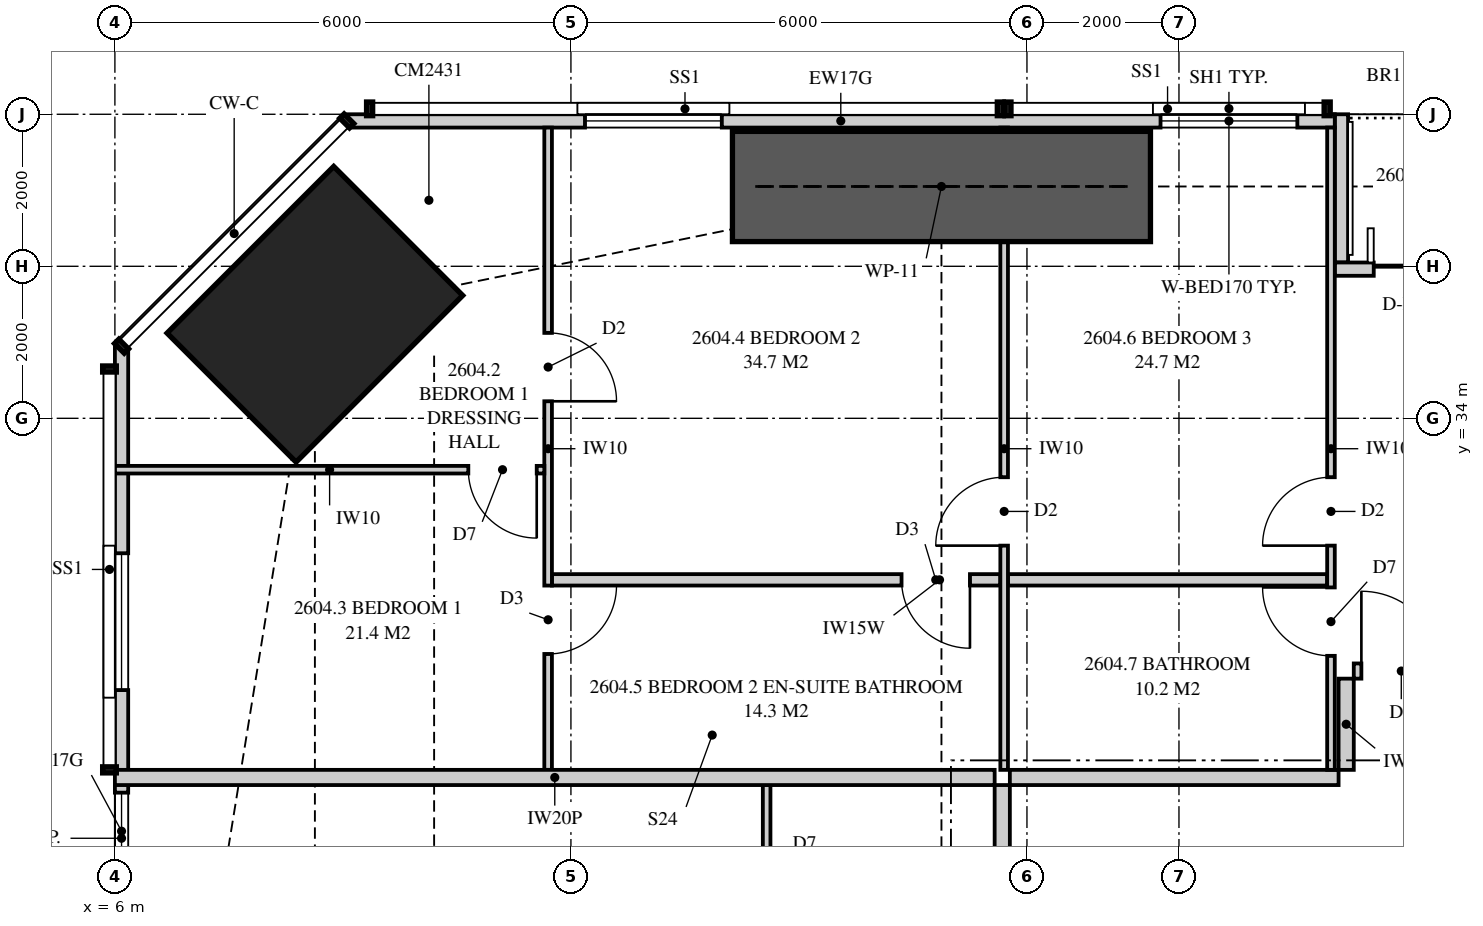
"""IFC4 building model, lengths in metres.
Left out: names, types, materials, properties, quantities, classifications, styles, units other than length and angle.
Written with IfcOpenShell. Run it as: python <this file> out.ifc"""

import sys

from ifc_helpers import new_model, si_unit, direction, frame, frame_2d, origin, origin_2d, place, context, subcontext, project, spatial, polyline, rectangle, outline, extrude, element, fill, save


model = new_model("IFC4")
c1 = context("Model", 3, precision=1e-05, world=origin(), true_north=direction((0.0, 1.0)))
c2 = subcontext(c1, "Body", "Model", "MODEL_VIEW")
j1 = project(units=[si_unit("LENGTHUNIT", "METRE"), si_unit("PLANEANGLEUNIT", "RADIAN")], contexts=[c1])
p1 = place(None, origin())
s1 = spatial("IfcSite", under=j1, at=p1, CompositionType="ELEMENT")
p2 = place(p1, origin())
s2 = spatial("IfcBuilding", under=s1, at=p2, CompositionType="ELEMENT")
p3 = place(p2, frame((0.0, 0.0, 98.15)))
s3 = spatial("IfcBuildingStorey", under=s2, at=p3, CompositionType="ELEMENT", Elevation=98.15)
p4 = place(p3, frame((8.631, 35.369, 0.0), z_axis=(0.0, 0.0, 1.0), x_axis=(0.707106781187, -0.707106781187, 0.0)))
e1 = element("IfcColumn", 1, at=p4, inside=s3, PredefinedType="COLUMN", context=c2, shape_type="SweptSolid", body=[
    extrude(rectangle(XDim=2.4, YDim=3.1, at=origin_2d()), origin(), (0.0, 0.0, 1.0), 3.35),
])
p5 = place(p3, frame((22.05, 37.913, 0.0), z_axis=(0.0, 0.0, 1.0), x_axis=(-1.0, 0.0, 0.0)))
e2 = element("IfcWall", 2, at=p5, inside=s3, PredefinedType="SOLIDWALL", context=c2, shape_type="SweptSolid", body=[
    extrude(outline(polyline([(0.0, 0.0), (12.999, 0.0), (12.999, 3.11), (5.378, 3.11), (5.378, 2.15), (5.333, 2.15), (5.333, 3.11), (5.175, 3.11), (5.175, 2.15), (0.0, 2.15), (0.0, 0.0)])), frame((0.0, 0.087, 0.0), z_axis=(0.0, -1.0, 0.0), x_axis=(1.0, 0.0, 0.0)), (0.0, 0.0, 1.0), 0.175),
])
p6 = place(p5, frame((0.492, 0.0, 0.4)))
e3 = element("IfcOpeningElement", 3, at=p6, cuts=e2, PredefinedType="OPENING", context=c2, shape_type="SweptSolid", body=[
    extrude(rectangle(XDim=1.8, YDim=1.7, at=frame_2d((0.9, 0.85))), frame((0.0, 0.097, 0.0), z_axis=(0.0, -1.0, 0.0), x_axis=(1.0, 0.0, 0.0)), (0.0, 0.0, 1.0), 0.195),
])
p7 = place(p5, frame((8.065, 0.0, 0.4)))
e4 = element("IfcOpeningElement", 4, at=p7, cuts=e2, PredefinedType="OPENING", context=c2, shape_type="SweptSolid", body=[
    extrude(rectangle(XDim=1.8, YDim=1.7, at=frame_2d((0.9, 0.85))), frame((0.0, 0.097, 0.0), z_axis=(0.0, -1.0, 0.0), x_axis=(1.0, 0.0, 0.0)), (0.0, 0.0, 1.0), 0.195),
])
p8 = place(p3, frame((24.875, 35.962, 0.0), z_axis=(0.0, 0.0, 1.0), x_axis=(-1.0, 0.0, 0.0)))
e5 = element("IfcWall", 5, at=p8, inside=s3, PredefinedType="SOLIDWALL", context=c2, shape_type="SweptSolid", body=[
    extrude(rectangle(XDim=2.825, YDim=0.175, at=frame_2d((1.413, 0.0))), origin(), (0.0, 0.0, 1.0), 3.11),
])
p9 = place(p8, frame((0.512, 0.0, 0.0)))
e6 = element("IfcOpeningElement", 6, at=p9, cuts=e5, PredefinedType="OPENING", context=c2, shape_type="SweptSolid", body=[
    extrude(rectangle(XDim=1.8, YDim=2.1, at=frame_2d((0.9, 1.05))), frame((0.0, 0.097, 0.0), z_axis=(0.0, -1.0, 0.0), x_axis=(1.0, 0.0, 0.0)), (0.0, 0.0, 1.0), 0.195),
])
p10 = place(p3, frame((22.137, 38.0, 0.0), z_axis=(0.0, 0.0, 1.0), x_axis=(0.0, -1.0, 0.0)))
e7 = element("IfcWall", 7, at=p10, inside=s3, PredefinedType="SOLIDWALL", context=c2, shape_type="SweptSolid", body=[
    extrude(outline(polyline([(0.0, 0.0), (1.95, 0.0), (1.95, 3.11), (1.75, 3.11), (1.75, 2.15), (0.15, 2.15), (0.15, 3.11), (0.0, 3.11), (0.0, 0.0)])), frame((0.0, 0.087, 0.0), z_axis=(0.0, -1.0, 0.0), x_axis=(1.0, 0.0, 0.0)), (0.0, 0.0, 1.0), 0.175),
])
p11 = place(p3, frame((6.087, 34.949, 0.0), z_axis=(0.0, 0.0, 1.0), x_axis=(0.0, -1.0, 0.0)))
e8 = element("IfcWall", 8, at=p11, inside=s3, PredefinedType="SOLIDWALL", context=c2, shape_type="SweptSolid", body=[
    extrude(outline(polyline([(0.0, 0.0), (12.761, 0.0), (12.761, 2.15), (9.949, 2.15), (9.949, 3.11), (9.823, 3.11), (9.823, 2.15), (9.73, 2.15), (9.73, 3.11), (0.0, 3.11), (0.0, 0.0)])), frame((0.0, 0.087, 0.0), z_axis=(0.0, -1.0, 0.0), x_axis=(1.0, 0.0, 0.0)), (0.0, 0.0, 1.0), 0.175),
])
p12 = place(p11, frame((2.724, 0.0, 0.4)))
e9 = element("IfcOpeningElement", 9, at=p12, cuts=e8, PredefinedType="OPENING", context=c2, shape_type="SweptSolid", body=[
    extrude(rectangle(XDim=1.8, YDim=1.7, at=frame_2d((0.9, 0.85))), frame((0.0, 0.097, 0.0), z_axis=(0.0, -1.0, 0.0), x_axis=(1.0, 0.0, 0.0)), (0.0, 0.0, 1.0), 0.195),
])
p13 = place(p11, frame((5.874, 0.0, 0.4)))
e10 = element("IfcOpeningElement", 10, at=p13, cuts=e8, PredefinedType="OPENING", context=c2, shape_type="SweptSolid", body=[
    extrude(rectangle(XDim=1.2, YDim=1.7, at=frame_2d((0.6, 0.85))), frame((0.0, 0.097, 0.0), z_axis=(0.0, -1.0, 0.0), x_axis=(1.0, 0.0, 0.0)), (0.0, 0.0, 1.0), 0.195),
])
p14 = place(p3, frame((17.775, 29.275, 0.0), z_axis=(0.0, 0.0, 1.0), x_axis=(1.0, 0.0, 0.0)))
e11 = element("IfcWall", 11, at=p14, inside=s3, PredefinedType="PARTITIONING", context=c2, shape_type="SweptSolid", body=[
    extrude(rectangle(XDim=4.325, YDim=0.2, at=frame_2d((2.163, 0.0))), origin(), (0.0, 0.0, 1.0), 3.11),
])
p15 = place(p3, frame((11.7, 37.825, 0.0), z_axis=(0.0, 0.0, 1.0), x_axis=(0.0, -1.0, 0.0)))
e12 = element("IfcWall", 12, at=p15, inside=s3, PredefinedType="PARTITIONING", context=c2, shape_type="SweptSolid", body=[
    extrude(outline(polyline([(0.0, 0.0), (8.45, 0.0), (8.45, 3.11), (2.708, 3.11), (2.708, 2.15), (0.953, 2.15), (0.953, 3.11), (0.0, 3.11), (0.0, 0.0)])), frame((0.0, 0.05, 0.0), z_axis=(0.0, -1.0, 0.0), x_axis=(1.0, 0.0, 0.0)), (0.0, 0.0, 1.0), 0.1),
])
p16 = place(p15, frame((2.701, 0.0, 0.0)))
e13 = element("IfcOpeningElement", 13, at=p16, cuts=e12, PredefinedType="OPENING", context=c2, shape_type="SweptSolid", body=[
    extrude(rectangle(XDim=0.9, YDim=2.1, at=frame_2d((0.45, 1.05))), frame((0.0, 0.06, 0.0), z_axis=(0.0, -1.0, 0.0), x_axis=(1.0, 0.0, 0.0)), (0.0, 0.0, 1.0), 0.12),
])
p17 = place(p15, frame((6.025, 0.0, 0.0)))
e14 = element("IfcOpeningElement", 14, at=p17, cuts=e12, PredefinedType="OPENING", context=c2, shape_type="SweptSolid", body=[
    extrude(rectangle(XDim=0.9, YDim=2.1, at=frame_2d((0.45, 1.05))), frame((0.0, 0.06, 0.0), z_axis=(0.0, -1.0, 0.0), x_axis=(1.0, 0.0, 0.0)), (0.0, 0.0, 1.0), 0.12),
])
p18 = place(p3, frame((17.7, 37.825, 0.0), z_axis=(0.0, 0.0, 1.0), x_axis=(0.0, -1.0, 0.0)))
e15 = element("IfcWall", 15, at=p18, inside=s3, PredefinedType="PARTITIONING", context=c2, shape_type="SweptSolid", body=[
    extrude(outline(polyline([(1.635, 2.15), (0.0, 2.15), (0.0, 0.0), (8.45, 0.0), (8.45, 3.11), (1.635, 3.11), (1.635, 2.15)]), holes=[polyline([(1.021, 0.116), (0.529, 0.116), (0.529, 0.906), (1.021, 0.906), (1.021, 0.116)]), polyline([(1.021, 1.244), (0.529, 1.244), (0.529, 2.034), (1.021, 2.034), (1.021, 1.244)])]), frame((0.0, 0.05, 0.0), z_axis=(0.0, -1.0, 0.0), x_axis=(1.0, 0.0, 0.0)), (0.0, 0.0, 1.0), 0.1),
])
p19 = place(p18, frame((4.6, 0.0, 0.0)))
e16 = element("IfcOpeningElement", 16, at=p19, cuts=e15, PredefinedType="OPENING", context=c2, shape_type="SweptSolid", body=[
    extrude(rectangle(XDim=0.9, YDim=2.1, at=frame_2d((0.45, 1.05))), frame((0.0, 0.06, 0.0), z_axis=(0.0, -1.0, 0.0), x_axis=(1.0, 0.0, 0.0)), (0.0, 0.0, 1.0), 0.12),
])
p20 = place(p3, frame((22.0, 37.825, 0.0), z_axis=(0.0, 0.0, 1.0), x_axis=(0.0, -1.0, 0.0)))
e17 = element("IfcWall", 17, at=p20, inside=s3, PredefinedType="PARTITIONING", context=c2, shape_type="SweptSolid", body=[
    extrude(outline(polyline([(0.0, 0.0), (8.45, 0.0), (8.45, 3.11), (1.635, 3.11), (1.635, 2.15), (0.0, 2.15), (0.0, 3.11), (0.0, 0.0)])), frame((0.0, 0.05, 0.0), z_axis=(0.0, -1.0, 0.0), x_axis=(1.0, 0.0, 0.0)), (0.0, 0.0, 1.0), 0.1),
])
p21 = place(p20, frame((4.6, 0.0, 0.0)))
e18 = element("IfcOpeningElement", 18, at=p21, cuts=e17, PredefinedType="OPENING", context=c2, shape_type="SweptSolid", body=[
    extrude(rectangle(XDim=0.9, YDim=2.1, at=frame_2d((0.45, 1.05))), frame((0.0, 0.06, 0.0), z_axis=(0.0, -1.0, 0.0), x_axis=(1.0, 0.0, 0.0)), (0.0, 0.0, 1.0), 0.12),
])
p22 = place(p20, frame((6.05, 0.0, 0.0)))
e19 = element("IfcOpeningElement", 19, at=p22, cuts=e17, PredefinedType="OPENING", context=c2, shape_type="SweptSolid", body=[
    extrude(rectangle(XDim=0.9, YDim=2.1, at=frame_2d((0.45, 1.05))), frame((0.0, 0.06, 0.0), z_axis=(0.0, -1.0, 0.0), x_axis=(1.0, 0.0, 0.0)), (0.0, 0.0, 1.0), 0.12),
])
p23 = place(p3, frame((6.0, 33.324, 0.0), z_axis=(0.0, 0.0, 1.0), x_axis=(1.0, 0.0, 0.0)))
e20 = element("IfcWall", 20, at=p23, inside=s3, PredefinedType="PARTITIONING", context=c2, shape_type="SweptSolid", body=[
    extrude(outline(polyline([(0.0, 0.0), (5.65, 0.0), (5.65, 3.11), (5.46, 3.11), (5.46, 2.51), (3.171, 2.51), (3.171, 2.15), (1.429, 2.15), (1.429, 3.11), (0.0, 3.11), (0.0, 0.0)])), frame((0.0, 0.05, 0.0), z_axis=(0.0, -1.0, 0.0), x_axis=(1.0, 0.0, 0.0)), (0.0, 0.0, 1.0), 0.1),
])
p24 = place(p23, frame((4.65, 0.0, 0.0)))
e21 = element("IfcOpeningElement", 21, at=p24, cuts=e20, PredefinedType="OPENING", context=c2, shape_type="SweptSolid", body=[
    extrude(rectangle(XDim=0.9, YDim=2.1, at=frame_2d((0.45, 1.05))), frame((0.0, 0.06, 0.0), z_axis=(0.0, -1.0, 0.0), x_axis=(1.0, 0.0, 0.0)), (0.0, 0.0, 1.0), 0.12),
])
p25 = place(p3, frame((11.75, 31.875, 0.0), z_axis=(0.0, 0.0, 1.0), x_axis=(1.0, 0.0, 0.0)))
e22 = element("IfcWall", 22, at=p25, inside=s3, PredefinedType="PLUMBINGWALL", context=c2, shape_type="SweptSolid", body=[
    extrude(outline(polyline([(0.0, 0.0), (5.9, 0.0), (5.9, 3.11), (5.438, 3.11), (5.438, 2.541), (4.812, 2.541), (4.812, 3.11), (0.0, 3.11), (0.0, 0.0)])), frame((0.0, 0.075, 0.0), z_axis=(0.0, -1.0, 0.0), x_axis=(1.0, 0.0, 0.0)), (0.0, 0.0, 1.0), 0.15),
])
p26 = place(p25, frame((4.6, 0.0, 0.0)))
e23 = element("IfcOpeningElement", 23, at=p26, cuts=e22, PredefinedType="OPENING", context=c2, shape_type="SweptSolid", body=[
    extrude(rectangle(XDim=0.9, YDim=2.1, at=frame_2d((0.45, 1.05))), frame((0.0, 0.085, 0.0), z_axis=(0.0, -1.0, 0.0), x_axis=(1.0, 0.0, 0.0)), (0.0, 0.0, 1.0), 0.17),
])
p27 = place(p3, frame((17.75, 31.875, 0.0), z_axis=(0.0, 0.0, 1.0), x_axis=(1.0, 0.0, 0.0)))
e24 = element("IfcWall", 24, at=p27, inside=s3, PredefinedType="PLUMBINGWALL", context=c2, shape_type="SweptSolid", body=[
    extrude(rectangle(XDim=4.2, YDim=0.15, at=frame_2d((2.1, 0.0))), origin(), (0.0, 0.0, 1.0), 3.11),
])
p28 = place(p3, frame((6.0, 29.275, 0.0), z_axis=(0.0, 0.0, 1.0), x_axis=(1.0, 0.0, 0.0)))
e25 = element("IfcWall", 25, at=p28, inside=s3, PredefinedType="PARTITIONING", context=c2, shape_type="SweptSolid", body=[
    extrude(outline(polyline([(0.0, 0.0), (11.575, 0.0), (11.575, 3.11), (11.212, 3.11), (11.212, 2.541), (10.538, 2.541), (10.538, 3.11), (5.51, 3.11), (5.51, 2.51), (2.969, 2.51), (2.969, 2.541), (2.565, 2.541), (2.565, 2.15), (0.721, 2.15), (0.721, 3.11), (0.0, 3.11), (0.0, 0.0)])), frame((0.0, 0.1, 0.0), z_axis=(0.0, -1.0, 0.0), x_axis=(1.0, 0.0, 0.0)), (0.0, 0.0, 1.0), 0.2),
])
p29 = place(p3, frame((14.575, 25.925, 0.0), z_axis=(0.0, 0.0, 1.0), x_axis=(0.0, 1.0, 0.0)))
e26 = element("IfcWall", 26, at=p29, inside=s3, PredefinedType="PARTITIONING", context=c2, shape_type="SweptSolid", body=[
    extrude(outline(polyline([(0.0, 0.0), (3.25, 0.0), (3.25, 3.11), (0.787, 3.11), (0.787, 2.541), (0.213, 2.541), (0.213, 3.11), (0.0, 3.11), (0.0, 0.0)])), frame((0.0, 0.05, 0.0), z_axis=(0.0, -1.0, 0.0), x_axis=(1.0, 0.0, 0.0)), (0.0, 0.0, 1.0), 0.1),
])
p30 = place(p29, frame((1.15, 0.0, 0.0)))
e27 = element("IfcOpeningElement", 27, at=p30, cuts=e26, PredefinedType="OPENING", context=c2, shape_type="SweptSolid", body=[
    extrude(rectangle(XDim=0.9, YDim=2.1, at=frame_2d((0.45, 1.05))), frame((0.0, 0.06, 0.0), z_axis=(0.0, -1.0, 0.0), x_axis=(1.0, 0.0, 0.0)), (0.0, 0.0, 1.0), 0.12),
])
p31 = place(p3, frame((22.3, 30.675, 0.0), z_axis=(0.0, 0.0, 1.0), x_axis=(1.0, 0.0, 0.0)))
e28 = element("IfcWall", 28, at=p31, inside=s3, PredefinedType="PARTITIONING", context=c2, shape_type="SweptSolid", body=[
    extrude(rectangle(XDim=2.4, YDim=0.2, at=frame_2d((1.2, 0.0))), origin(), (0.0, 0.0, 1.0), 3.11),
])
p32 = place(p31, frame((0.1, 0.0, 0.0)))
e29 = element("IfcOpeningElement", 29, at=p32, cuts=e28, PredefinedType="OPENING", context=c2, shape_type="SweptSolid", body=[
    extrude(rectangle(XDim=1.05, YDim=2.2, at=frame_2d((0.525, 1.1))), frame((0.0, 0.11, 0.0), z_axis=(0.0, -1.0, 0.0), x_axis=(1.0, 0.0, 0.0)), (0.0, 0.0, 1.0), 0.22),
])
p33 = place(p3, frame((22.2, 29.375, 0.0), z_axis=(0.0, 0.0, 1.0), x_axis=(0.0, 1.0, 0.0)))
e30 = element("IfcWall", 30, at=p33, inside=s3, PredefinedType="PARTITIONING", context=c2, shape_type="SweptSolid", body=[
    extrude(rectangle(XDim=1.2, YDim=0.2, at=frame_2d((0.6, 0.0))), origin(), (0.0, 0.0, 1.0), 3.11),
])
p34 = place(p3, frame((17.675, 23.238, 0.0), z_axis=(0.0, 0.0, 1.0), x_axis=(0.0, 1.0, 0.0)))
e31 = element("IfcWall", 31, at=p34, inside=s3, PredefinedType="PARTITIONING", context=c2, shape_type="SweptSolid", body=[
    extrude(outline(polyline([(0.0, 0.0), (5.938, 0.0), (5.938, 3.11), (3.525, 3.11), (3.525, 2.541), (2.85, 2.541), (2.85, 3.11), (0.0, 3.11), (0.0, 0.0)])), frame((0.0, 0.1, 0.0), z_axis=(0.0, -1.0, 0.0), x_axis=(1.0, 0.0, 0.0)), (0.0, 0.0, 1.0), 0.2),
])
p35 = place(p3, frame((14.125, 37.05, 0.0), z_axis=(0.0, 0.0, 1.0), x_axis=(1.0, 0.0, 0.0)))
e32 = element("IfcWall", 32, at=p35, inside=s3, PredefinedType="SHEAR", context=c2, shape_type="SweptSolid", body=[
    extrude(rectangle(XDim=5.5, YDim=1.45, at=frame_2d((2.75, 0.0))), origin(), (0.0, 0.0, 1.0), 3.35),
])
p36 = place(p9, origin())
e33 = element("IfcDoor", 33, at=p36, inside=s3, OperationType="SLIDING_TO_LEFT", PredefinedType="DOOR", context=c2, shape_type="SweptSolid", body=[
    extrude(rectangle(XDim=1.8, YDim=2.1, at=frame_2d((0.9, 1.05))), frame((0.0, 0.025, 0.0), z_axis=(0.0, -1.0, 0.0), x_axis=(1.0, 0.0, 0.0)), (0.0, 0.0, 1.0), 0.05),
])
fill(e6, e33)
p37 = place(p6, origin())
e34 = element("IfcWindow", 34, at=p37, inside=s3, PartitioningType="SINGLE_PANEL", PredefinedType="WINDOW", context=c2, shape_type="SweptSolid", body=[
    extrude(rectangle(XDim=1.8, YDim=1.7, at=frame_2d((0.9, 0.85))), frame((0.0, 0.03, 0.0), z_axis=(0.0, -1.0, 0.0), x_axis=(1.0, 0.0, 0.0)), (0.0, 0.0, 1.0), 0.06),
])
fill(e3, e34)
p38 = place(p7, origin())
e35 = element("IfcWindow", 35, at=p38, inside=s3, PartitioningType="SINGLE_PANEL", PredefinedType="WINDOW", context=c2, shape_type="SweptSolid", body=[
    extrude(rectangle(XDim=1.8, YDim=1.7, at=frame_2d((0.9, 0.85))), frame((0.0, 0.03, 0.0), z_axis=(0.0, -1.0, 0.0), x_axis=(1.0, 0.0, 0.0)), (0.0, 0.0, 1.0), 0.06),
])
fill(e4, e35)
p39 = place(p12, origin())
e36 = element("IfcWindow", 36, at=p39, inside=s3, PartitioningType="SINGLE_PANEL", PredefinedType="WINDOW", context=c2, shape_type="SweptSolid", body=[
    extrude(rectangle(XDim=1.8, YDim=1.7, at=frame_2d((0.9, 0.85))), frame((0.0, 0.03, 0.0), z_axis=(0.0, -1.0, 0.0), x_axis=(1.0, 0.0, 0.0)), (0.0, 0.0, 1.0), 0.06),
])
fill(e9, e36)
p40 = place(p13, origin())
e37 = element("IfcWindow", 37, at=p40, inside=s3, PartitioningType="SINGLE_PANEL", PredefinedType="WINDOW", context=c2, shape_type="SweptSolid", body=[
    extrude(rectangle(XDim=1.2, YDim=1.7, at=frame_2d((0.6, 0.85))), frame((0.0, 0.03, 0.0), z_axis=(0.0, -1.0, 0.0), x_axis=(1.0, 0.0, 0.0)), (0.0, 0.0, 1.0), 0.06),
])
fill(e10, e37)
p41 = place(p32, origin())
e38 = element("IfcDoor", 38, at=p41, inside=s3, OperationType="SINGLE_SWING_LEFT", PredefinedType="DOOR", context=c2, shape_type="SweptSolid", body=[
    extrude(rectangle(XDim=1.05, YDim=2.2, at=frame_2d((0.525, 1.1))), frame((0.0, 0.025, 0.0), z_axis=(0.0, -1.0, 0.0), x_axis=(1.0, 0.0, 0.0)), (0.0, 0.0, 1.0), 0.05),
])
fill(e29, e38)
p42 = place(p24, frame((0.9, 0.0, 0.0), z_axis=(0.0, 0.0, 1.0), x_axis=(-1.0, 0.0, 0.0)))
e39 = element("IfcDoor", 39, at=p42, inside=s3, OperationType="SINGLE_SWING_LEFT", PredefinedType="DOOR", context=c2, shape_type="SweptSolid", body=[
    extrude(rectangle(XDim=0.9, YDim=2.1, at=frame_2d((0.45, 1.05))), frame((0.0, 0.025, 0.0), z_axis=(0.0, -1.0, 0.0), x_axis=(1.0, 0.0, 0.0)), (0.0, 0.0, 1.0), 0.05),
])
fill(e21, e39)
p43 = place(p16, origin())
e40 = element("IfcDoor", 40, at=p43, inside=s3, OperationType="SINGLE_SWING_RIGHT", PredefinedType="DOOR", context=c2, shape_type="SweptSolid", body=[
    extrude(rectangle(XDim=0.9, YDim=2.1, at=frame_2d((0.45, 1.05))), frame((0.0, 0.025, 0.0), z_axis=(0.0, -1.0, 0.0), x_axis=(1.0, 0.0, 0.0)), (0.0, 0.0, 1.0), 0.05),
])
fill(e13, e40)
p44 = place(p19, frame((0.9, 0.0, 0.0), z_axis=(0.0, 0.0, 1.0), x_axis=(-1.0, 0.0, 0.0)))
e41 = element("IfcDoor", 41, at=p44, inside=s3, OperationType="SINGLE_SWING_LEFT", PredefinedType="DOOR", context=c2, shape_type="SweptSolid", body=[
    extrude(rectangle(XDim=0.9, YDim=2.1, at=frame_2d((0.45, 1.05))), frame((0.0, 0.025, 0.0), z_axis=(0.0, -1.0, 0.0), x_axis=(1.0, 0.0, 0.0)), (0.0, 0.0, 1.0), 0.05),
])
fill(e16, e41)
p45 = place(p26, frame((0.9, 0.0, 0.0), z_axis=(0.0, 0.0, 1.0), x_axis=(-1.0, 0.0, 0.0)))
e42 = element("IfcDoor", 42, at=p45, inside=s3, OperationType="SINGLE_SWING_LEFT", PredefinedType="DOOR", context=c2, shape_type="SweptSolid", body=[
    extrude(rectangle(XDim=0.9, YDim=2.1, at=frame_2d((0.45, 1.05))), frame((0.0, 0.025, 0.0), z_axis=(0.0, -1.0, 0.0), x_axis=(1.0, 0.0, 0.0)), (0.0, 0.0, 1.0), 0.05),
])
fill(e23, e42)
p46 = place(p21, frame((0.9, 0.0, 0.0), z_axis=(0.0, 0.0, 1.0), x_axis=(-1.0, 0.0, 0.0)))
e43 = element("IfcDoor", 43, at=p46, inside=s3, OperationType="SINGLE_SWING_LEFT", PredefinedType="DOOR", context=c2, shape_type="SweptSolid", body=[
    extrude(rectangle(XDim=0.9, YDim=2.1, at=frame_2d((0.45, 1.05))), frame((0.0, 0.025, 0.0), z_axis=(0.0, -1.0, 0.0), x_axis=(1.0, 0.0, 0.0)), (0.0, 0.0, 1.0), 0.05),
])
fill(e18, e43)
p47 = place(p22, frame((0.9, 0.0, 0.0), z_axis=(0.0, 0.0, 1.0), x_axis=(-1.0, 0.0, 0.0)))
e44 = element("IfcDoor", 44, at=p47, inside=s3, OperationType="SINGLE_SWING_RIGHT", PredefinedType="DOOR", context=c2, shape_type="SweptSolid", body=[
    extrude(rectangle(XDim=0.9, YDim=2.1, at=frame_2d((0.45, 1.05))), frame((0.0, 0.025, 0.0), z_axis=(0.0, -1.0, 0.0), x_axis=(1.0, 0.0, 0.0)), (0.0, 0.0, 1.0), 0.05),
])
fill(e19, e44)
p48 = place(p17, origin())
e45 = element("IfcDoor", 45, at=p48, inside=s3, OperationType="SINGLE_SWING_LEFT", PredefinedType="DOOR", context=c2, shape_type="SweptSolid", body=[
    extrude(rectangle(XDim=0.9, YDim=2.1, at=frame_2d((0.45, 1.05))), frame((0.0, 0.025, 0.0), z_axis=(0.0, -1.0, 0.0), x_axis=(1.0, 0.0, 0.0)), (0.0, 0.0, 1.0), 0.05),
])
fill(e14, e45)
save(model, sys.argv[1])
